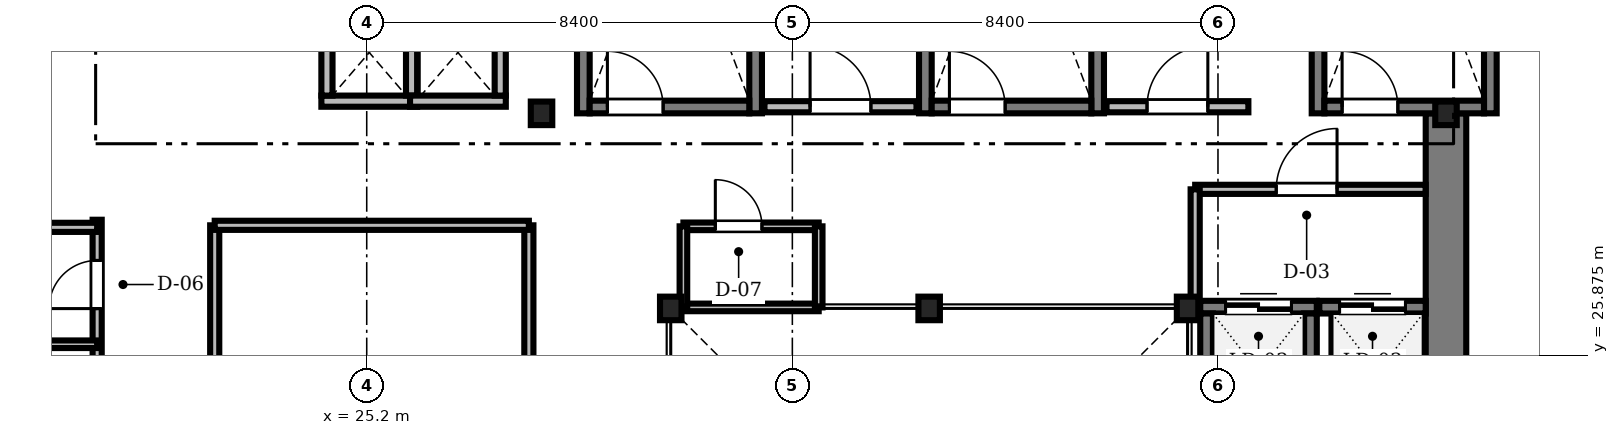
"""IFC4 building model, lengths in metres.
Left out: names, types, materials, properties, quantities, classifications, styles, units other than length and angle.
Written with IfcOpenShell. Run it as: python <this file> out.ifc"""

import sys

from ifc_helpers import new_model, si_unit, direction, frame, frame_2d, origin, origin_2d, place, context, subcontext, project, spatial, rectangle, i_section, extrude, source, transform, mapped, element, fill, save


model = new_model("IFC4")
c1 = context("Model", 3, precision=1e-05, world=origin(), true_north=direction((0.0, 1.0)))
c2 = subcontext(c1, "Body", "Model", "MODEL_VIEW")
j1 = project(units=[si_unit("LENGTHUNIT", "METRE"), si_unit("PLANEANGLEUNIT", "RADIAN")], contexts=[c1])
p1 = place(None, origin())
s1 = spatial("IfcSite", under=j1, at=p1, CompositionType="ELEMENT")
p2 = place(p1, origin())
s2 = spatial("IfcBuilding", under=s1, at=p2, CompositionType="ELEMENT")
p3 = place(p2, frame((0.0, 0.0, 144.6)))
s3 = spatial("IfcBuildingStorey", under=s2, at=p3, CompositionType="ELEMENT", Elevation=144.6)
m1 = source(origin(), c2, "Body", "SweptSolid", [
    extrude(rectangle(XDim=13.15, YDim=0.8, at=frame_2d((6.575, 0.0))), origin(), (0.0, 0.0, 1.0), 3.46),
])
p4 = place(p3, frame((46.5, 17.5, 0.0), z_axis=(0.0, 0.0, 1.0), x_axis=(0.0, 1.0, 0.0)))
e1 = element("IfcWall", 1, at=p4, inside=s3, PredefinedType="SHEAR", context=c2, shape_type="MappedRepresentation", body=[
    mapped(m1, transform((0.0, 0.0, 0.0), scale=1.0)),
])
m2 = source(origin(), c2, "Body", "SweptSolid", [
    extrude(i_section(OverallWidth=0.424, OverallDepth=0.465, WebThickness=0.035, FlangeThickness=0.056, FilletRadius=0.015, at=origin_2d()), origin(), (0.0, 0.0, 1.0), 3.46),
])
for number, where, z_axis, x_axis in (
    (2, (41.4, 26.8, 0.0), (0.0, 0.0, 1.0), (1.0, 0.0, 0.0)),
    (3, (36.3, 26.8, 0.0), (0.0, 0.0, 1.0), (1.0, 0.0, 0.0)),
    (4, (31.2, 26.8, 0.0), (0.0, 0.0, 1.0), (1.0, 0.0, 0.0)),
    (5, (28.65, 30.65, 0.0), (0.0, 0.0, 1.0), (1.0, 0.0, 0.0)),
    (6, (46.5, 30.65, 0.0), (0.0, 0.0, 1.0), (1.0, 0.0, 0.0)),
):
    element("IfcColumn", number, at=place(p3, frame(where, z_axis=z_axis, x_axis=x_axis)), inside=s3, PredefinedType="COLUMN", context=c2, shape_type="MappedRepresentation", body=[
        mapped(m2, transform((0.0, 0.0, 0.0), scale=1.0)),
    ])
m3 = source(origin(), c2, "Body", "SweptSolid", [
    extrude(rectangle(XDim=9.25, YDim=0.25, at=frame_2d((4.625, 0.0))), origin(), (0.0, 0.0, 1.0), 3.5),
])
for number, where, z_axis, x_axis in (
    (7, (29.475, 30.65, 0.0), (0.0, 0.0, 1.0), (0.0, 1.0, 0.0)),
    (8, (32.875, 30.65, 0.0), (0.0, 0.0, 1.0), (0.0, 1.0, 0.0)),
):
    element("IfcWall", number, at=place(p3, frame(where, z_axis=z_axis, x_axis=x_axis)), inside=s3, PredefinedType="SOLIDWALL", context=c2, shape_type="MappedRepresentation", body=[
        mapped(m3, transform((0.0, 0.0, 0.0), scale=1.0)),
    ])
m4 = source(origin(), c2, "Body", "SweptSolid", [
    extrude(rectangle(XDim=3.15, YDim=0.25, at=frame_2d((1.575, 0.0))), origin(), (0.0, 0.0, 1.0), 3.5),
])
p5 = place(p3, frame((29.6, 30.775, 0.0), z_axis=(0.0, 0.0, 1.0), x_axis=(1.0, 0.0, 0.0)))
e9 = element("IfcWall", 9, at=p5, inside=s3, PredefinedType="SOLIDWALL", context=c2, shape_type="MappedRepresentation", body=[
    mapped(m4, transform((0.0, 0.0, 0.0), scale=1.0)),
])
m5 = source(origin(), c2, "Body", "SweptSolid", [
    extrude(rectangle(XDim=1.1, YDim=2.2, at=frame_2d((0.55, 1.1))), frame((0.0, 0.135, 0.0), z_axis=(0.0, -1.0, 0.0), x_axis=(1.0, 0.0, 0.0)), (0.0, 0.0, 1.0), 0.27),
])
p6 = place(p5, frame((0.35, 0.0, 0.0)))
e10 = element("IfcOpeningElement", 10, at=p6, cuts=e9, PredefinedType="OPENING", context=c2, shape_type="MappedRepresentation", body=[
    mapped(m5, transform((0.0, 0.0, 0.0), scale=1.0)),
])
for number, where, z_axis, x_axis in (
    (11, (36.225, 30.65, 0.0), (0.0, 0.0, 1.0), (0.0, 1.0, 0.0)),
    (12, (39.625, 30.65, 0.0), (0.0, 0.0, 1.0), (0.0, 1.0, 0.0)),
):
    element("IfcWall", number, at=place(p3, frame(where, z_axis=z_axis, x_axis=x_axis)), inside=s3, PredefinedType="SOLIDWALL", context=c2, shape_type="MappedRepresentation", body=[
        mapped(m3, transform((0.0, 0.0, 0.0), scale=1.0)),
    ])
p7 = place(p3, frame((36.35, 30.775, 0.0), z_axis=(0.0, 0.0, 1.0), x_axis=(1.0, 0.0, 0.0)))
e13 = element("IfcWall", 13, at=p7, inside=s3, PredefinedType="SOLIDWALL", context=c2, shape_type="MappedRepresentation", body=[
    mapped(m4, transform((0.0, 0.0, 0.0), scale=1.0)),
])
p8 = place(p7, frame((0.35, 0.0, 0.0)))
e14 = element("IfcOpeningElement", 14, at=p8, cuts=e13, PredefinedType="OPENING", context=c2, shape_type="MappedRepresentation", body=[
    mapped(m5, transform((0.0, 0.0, 0.0), scale=1.0)),
])
for number, where, z_axis, x_axis in (
    (15, (43.975, 30.65, 0.0), (0.0, 0.0, 1.0), (0.0, 1.0, 0.0)),
    (16, (47.375, 30.65, 0.0), (0.0, 0.0, 1.0), (0.0, 1.0, 0.0)),
):
    element("IfcWall", number, at=place(p3, frame(where, z_axis=z_axis, x_axis=x_axis)), inside=s3, PredefinedType="SOLIDWALL", context=c2, shape_type="MappedRepresentation", body=[
        mapped(m3, transform((0.0, 0.0, 0.0), scale=1.0)),
    ])
p9 = place(p3, frame((44.1, 30.775, 0.0), z_axis=(0.0, 0.0, 1.0), x_axis=(1.0, 0.0, 0.0)))
e17 = element("IfcWall", 17, at=p9, inside=s3, PredefinedType="SOLIDWALL", context=c2, shape_type="MappedRepresentation", body=[
    mapped(m4, transform((0.0, 0.0, 0.0), scale=1.0)),
])
p10 = place(p9, frame((0.35, 0.0, 0.0)))
e18 = element("IfcOpeningElement", 18, at=p10, cuts=e17, PredefinedType="OPENING", context=c2, shape_type="MappedRepresentation", body=[
    mapped(m5, transform((0.0, 0.0, 0.0), scale=1.0)),
])
m6 = source(origin(), c2, "Body", "SweptSolid", [
    extrude(rectangle(XDim=3.0, YDim=0.22, at=frame_2d((1.5, 0.0))), origin(), (0.0, 0.0, 1.0), 3.46),
])
p11 = place(p3, frame((33.05, 30.78, 0.0), z_axis=(0.0, 0.0, 1.0), x_axis=(1.0, 0.0, 0.0)))
e19 = element("IfcWall", 19, at=p11, inside=s3, PredefinedType="SOLIDWALL", context=c2, shape_type="MappedRepresentation", body=[
    mapped(m6, transform((0.0, 0.0, 0.0), scale=1.0)),
])
m7 = source(origin(), c2, "Body", "SweptSolid", [
    extrude(rectangle(XDim=1.2, YDim=2.2, at=frame_2d((0.6, 1.1))), frame((0.0, 0.12, 0.0), z_axis=(0.0, -1.0, 0.0), x_axis=(1.0, 0.0, 0.0)), (0.0, 0.0, 1.0), 0.24),
])
p12 = place(p11, frame((0.9, 0.0, 0.0)))
e20 = element("IfcOpeningElement", 20, at=p12, cuts=e19, PredefinedType="OPENING", context=c2, shape_type="MappedRepresentation", body=[
    mapped(m7, transform((0.0, 0.0, 0.0), scale=1.0)),
])
m8 = source(origin(), c2, "Body", "SweptSolid", [
    extrude(rectangle(XDim=2.8, YDim=0.22, at=frame_2d((1.4, 0.0))), origin(), (0.0, 0.0, 1.0), 3.46),
])
p13 = place(p3, frame((39.8, 30.78, 0.0), z_axis=(0.0, 0.0, 1.0), x_axis=(1.0, 0.0, 0.0)))
e21 = element("IfcWall", 21, at=p13, inside=s3, PredefinedType="SOLIDWALL", context=c2, shape_type="MappedRepresentation", body=[
    mapped(m8, transform((0.0, 0.0, 0.0), scale=1.0)),
])
p14 = place(p13, frame((0.8, 0.0, 0.0)))
e22 = element("IfcOpeningElement", 22, at=p14, cuts=e21, PredefinedType="OPENING", context=c2, shape_type="MappedRepresentation", body=[
    mapped(m7, transform((0.0, 0.0, 0.0), scale=1.0)),
])
m9 = source(origin(), c2, "Body", "SweptSolid", [
    extrude(rectangle(XDim=1.89, YDim=0.22, at=frame_2d((0.945, 0.0))), origin(), (0.0, 0.0, 1.0), 3.46),
])
p15 = place(p3, frame((24.305, 30.89, 0.0), z_axis=(0.0, 0.0, 1.0), x_axis=(1.0, 0.0, 0.0)))
e23 = element("IfcWall", 23, at=p15, inside=s3, PredefinedType="SOLIDWALL", context=c2, shape_type="MappedRepresentation", body=[
    mapped(m9, transform((0.0, 0.0, 0.0), scale=1.0)),
])
m10 = source(origin(), c2, "Body", "SweptSolid", [
    extrude(rectangle(XDim=1.7, YDim=0.22, at=frame_2d((0.85, 0.0))), origin(), (0.0, 0.0, 1.0), 3.46),
])
for number, where, z_axis, x_axis in (
    (24, (24.415, 31.0, 0.0), (0.0, 0.0, 1.0), (0.0, 1.0, 0.0)),
    (25, (26.085, 31.0, 0.0), (0.0, 0.0, 1.0), (0.0, 1.0, 0.0)),
):
    element("IfcWall", number, at=place(p3, frame(where, z_axis=z_axis, x_axis=x_axis)), inside=s3, PredefinedType="SOLIDWALL", context=c2, shape_type="MappedRepresentation", body=[
        mapped(m10, transform((0.0, 0.0, 0.0), scale=1.0)),
    ])
p16 = place(p3, frame((26.055, 30.89, 0.0), z_axis=(0.0, 0.0, 1.0), x_axis=(1.0, 0.0, 0.0)))
e26 = element("IfcWall", 26, at=p16, inside=s3, PredefinedType="SOLIDWALL", context=c2, shape_type="MappedRepresentation", body=[
    mapped(m9, transform((0.0, 0.0, 0.0), scale=1.0)),
])
p17 = place(p3, frame((27.835, 31.0, 0.0), z_axis=(0.0, 0.0, 1.0), x_axis=(0.0, 1.0, 0.0)))
e27 = element("IfcWall", 27, at=p17, inside=s3, PredefinedType="SOLIDWALL", context=c2, shape_type="MappedRepresentation", body=[
    mapped(m10, transform((0.0, 0.0, 0.0), scale=1.0)),
])
m11 = source(origin(), c2, "Body", "SweptSolid", [
    extrude(rectangle(XDim=2.3, YDim=0.25, at=frame_2d((1.15, 0.0))), origin(), (0.0, 0.0, 1.0), 3.46),
])
p18 = place(p3, frame((41.65, 26.825, 0.0), z_axis=(0.0, 0.0, 1.0), x_axis=(1.0, 0.0, 0.0)))
e28 = element("IfcWall", 28, at=p18, inside=s3, PredefinedType="SOLIDWALL", context=c2, shape_type="MappedRepresentation", body=[
    mapped(m11, transform((0.0, 0.0, 0.0), scale=1.0)),
])
m12 = source(origin(), c2, "Body", "SweptSolid", [
    extrude(rectangle(XDim=1.3, YDim=2.3, at=frame_2d((0.65, 1.15))), frame((0.0, 0.135, 0.0), z_axis=(0.0, -1.0, 0.0), x_axis=(1.0, 0.0, 0.0)), (0.0, 0.0, 1.0), 0.27),
])
p19 = place(p18, frame((0.5, 0.0, 0.0)))
e29 = element("IfcOpeningElement", 29, at=p19, cuts=e28, PredefinedType="OPENING", context=c2, shape_type="MappedRepresentation", body=[
    mapped(m12, transform((0.0, 0.0, 0.0), scale=1.0)),
])
for number, where, z_axis, x_axis in (
    (30, (41.775, 24.4, 0.0), (0.0, 0.0, 1.0), (0.0, 1.0, 0.0)),
    (31, (43.825, 24.4, 0.0), (0.0, 0.0, 1.0), (0.0, 1.0, 0.0)),
):
    element("IfcWall", number, at=place(p3, frame(where, z_axis=z_axis, x_axis=x_axis)), inside=s3, PredefinedType="SOLIDWALL", context=c2, shape_type="MappedRepresentation", body=[
        mapped(m11, transform((0.0, 0.0, 0.0), scale=1.0)),
    ])
m13 = source(origin(), c2, "Body", "SweptSolid", [
    extrude(rectangle(XDim=2.1, YDim=0.25, at=frame_2d((1.05, 0.0))), origin(), (0.0, 0.0, 1.0), 3.46),
])
p20 = place(p3, frame((44.0, 26.825, 0.0), z_axis=(0.0, 0.0, 1.0), x_axis=(1.0, 0.0, 0.0)))
e32 = element("IfcWall", 32, at=p20, inside=s3, PredefinedType="SOLIDWALL", context=c2, shape_type="MappedRepresentation", body=[
    mapped(m13, transform((0.0, 0.0, 0.0), scale=1.0)),
])
p21 = place(p20, frame((0.4, 0.0, 0.0)))
e33 = element("IfcOpeningElement", 33, at=p21, cuts=e32, PredefinedType="OPENING", context=c2, shape_type="MappedRepresentation", body=[
    mapped(m12, transform((0.0, 0.0, 0.0), scale=1.0)),
])
m14 = source(origin(), c2, "Body", "SweptSolid", [
    extrude(rectangle(XDim=14.0, YDim=0.18, at=frame_2d((7.0, 0.0))), origin(), (0.0, 0.0, 1.0), 2.852),
])
p22 = place(p3, frame((19.88, 14.55, 0.0), z_axis=(0.0, 0.0, 1.0), x_axis=(0.0, 1.0, 0.0)))
e34 = element("IfcWall", 34, at=p22, inside=s3, PredefinedType="PARTITIONING", context=c2, shape_type="MappedRepresentation", body=[
    mapped(m14, transform((0.0, 0.0, 0.0), scale=1.0)),
])
m15 = source(origin(), c2, "Body", "SweptSolid", [
    extrude(rectangle(XDim=1.05, YDim=2.2, at=frame_2d((0.525, 1.1))), frame((0.0, 0.1, 0.0), z_axis=(0.0, -1.0, 0.0), x_axis=(1.0, 0.0, 0.0)), (0.0, 0.0, 1.0), 0.2),
])
p23 = place(p22, frame((1.788, 0.0, 0.0)))
e35 = element("IfcOpeningElement", 35, at=p23, cuts=e34, PredefinedType="OPENING", context=c2, shape_type="MappedRepresentation", body=[
    mapped(m15, transform((0.0, 0.0, 0.0), scale=1.0)),
])
m16 = source(origin(), c2, "Body", "SweptSolid", [
    extrude(rectangle(XDim=0.95, YDim=2.15, at=frame_2d((0.475, 1.075))), frame((0.0, 0.1, 0.0), z_axis=(0.0, -1.0, 0.0), x_axis=(1.0, 0.0, 0.0)), (0.0, 0.0, 1.0), 0.2),
])
p24 = place(p22, frame((7.63, 0.0, 0.0)))
e36 = element("IfcOpeningElement", 36, at=p24, cuts=e34, PredefinedType="OPENING", context=c2, shape_type="MappedRepresentation", body=[
    mapped(m16, transform((0.0, 0.0, 0.0), scale=1.0)),
])
p25 = place(p22, frame((12.247, 0.0, 0.0)))
e37 = element("IfcOpeningElement", 37, at=p25, cuts=e34, PredefinedType="OPENING", context=c2, shape_type="MappedRepresentation", body=[
    mapped(m16, transform((0.0, 0.0, 0.0), scale=1.0)),
])
m17 = source(origin(), c2, "Body", "SweptSolid", [
    extrude(rectangle(XDim=6.54, YDim=0.18, at=frame_2d((3.27, 0.0))), origin(), (0.0, 0.0, 1.0), 2.852),
])
p26 = place(p3, frame((22.2, 21.9, 0.0), z_axis=(0.0, 0.0, 1.0), x_axis=(0.0, 1.0, 0.0)))
e38 = element("IfcWall", 38, at=p26, inside=s3, PredefinedType="PARTITIONING", context=c2, shape_type="MappedRepresentation", body=[
    mapped(m17, transform((0.0, 0.0, 0.0), scale=1.0)),
])
p27 = place(p26, frame((2.2, 0.0, 0.0)))
e39 = element("IfcOpeningElement", 39, at=p27, cuts=e38, PredefinedType="OPENING", context=c2, shape_type="MappedRepresentation", body=[
    mapped(m15, transform((0.0, 0.0, 0.0), scale=1.0)),
])
m18 = source(origin(), c2, "Body", "SweptSolid", [
    extrude(rectangle(XDim=4.548, YDim=0.18, at=frame_2d((2.274, 0.0))), origin(), (0.0, 0.0, 1.0), 3.092),
])
p28 = place(p3, frame((41.55, 29.15, 0.0), z_axis=(0.0, 0.0, 1.0), x_axis=(1.0, 0.0, 0.0)))
e40 = element("IfcWall", 40, at=p28, inside=s3, PredefinedType="PARTITIONING", context=c2, shape_type="MappedRepresentation", body=[
    mapped(m18, transform((0.0, 0.0, 0.0), scale=1.0)),
])
m19 = source(origin(), c2, "Body", "SweptSolid", [
    extrude(rectangle(XDim=1.2, YDim=2.2, at=frame_2d((0.6, 1.1))), frame((0.0, 0.1, 0.0), z_axis=(0.0, -1.0, 0.0), x_axis=(1.0, 0.0, 0.0)), (0.0, 0.0, 1.0), 0.2),
])
p29 = place(p28, frame((1.6, 0.0, 0.0)))
e41 = element("IfcOpeningElement", 41, at=p29, cuts=e40, PredefinedType="OPENING", context=c2, shape_type="MappedRepresentation", body=[
    mapped(m19, transform((0.0, 0.0, 0.0), scale=1.0)),
])
m20 = source(origin(), c2, "Body", "SweptSolid", [
    extrude(rectangle(XDim=2.67, YDim=0.15, at=frame_2d((1.335, 0.0))), origin(), (0.0, 0.0, 1.0), 3.092),
])
p30 = place(p3, frame((31.45, 28.42, 0.0), z_axis=(0.0, 0.0, 1.0), x_axis=(1.0, 0.0, 0.0)))
e42 = element("IfcWall", 42, at=p30, inside=s3, PredefinedType="PARTITIONING", context=c2, shape_type="MappedRepresentation", body=[
    mapped(m20, transform((0.0, 0.0, 0.0), scale=1.0)),
])
m21 = source(origin(), c2, "Body", "SweptSolid", [
    extrude(rectangle(XDim=0.92, YDim=2.1, at=frame_2d((0.46, 1.05))), frame((0.0, 0.085, 0.0), z_axis=(0.0, -1.0, 0.0), x_axis=(1.0, 0.0, 0.0)), (0.0, 0.0, 1.0), 0.17),
])
p31 = place(p30, frame((0.63, 0.0, 0.0)))
e43 = element("IfcOpeningElement", 43, at=p31, cuts=e42, PredefinedType="OPENING", context=c2, shape_type="MappedRepresentation", body=[
    mapped(m21, transform((0.0, 0.0, 0.0), scale=1.0)),
])
m22 = source(origin(), c2, "Body", "SweptSolid", [
    extrude(rectangle(XDim=13.15, YDim=0.18, at=frame_2d((6.575, 0.0))), origin(), (0.0, 0.0, 1.0), 2.702),
])
p32 = place(p3, frame((6.73, 28.4, 0.0), z_axis=(0.0, 0.0, 1.0), x_axis=(1.0, 0.0, 0.0)))
e44 = element("IfcWall", 44, at=p32, inside=s3, PredefinedType="PARTITIONING", context=c2, shape_type="MappedRepresentation", body=[
    mapped(m22, transform((0.0, 0.0, 0.0), scale=1.0)),
])
p33 = place(p3, frame((28.4, 21.9, 0.0), z_axis=(0.0, 0.0, 1.0), x_axis=(0.0, 1.0, 0.0)))
e45 = element("IfcWall", 45, at=p33, inside=s3, PredefinedType="PARTITIONING", context=c2, shape_type="MappedRepresentation", body=[
    mapped(m17, transform((0.0, 0.0, 0.0), scale=1.0)),
])
m23 = source(origin(), c2, "Body", "SweptSolid", [
    extrude(rectangle(XDim=6.2, YDim=0.18, at=frame_2d((3.1, 0.0))), origin(), (0.0, 0.0, 1.0), 3.46),
])
p34 = place(p3, frame((22.2, 28.44, 0.0), z_axis=(0.0, 0.0, 1.0), x_axis=(1.0, 0.0, 0.0)))
e46 = element("IfcWall", 46, at=p34, inside=s3, PredefinedType="PARTITIONING", context=c2, shape_type="MappedRepresentation", body=[
    mapped(m23, transform((0.0, 0.0, 0.0), scale=1.0)),
])
m24 = source(origin(), c2, "Body", "SweptSolid", [
    extrude(rectangle(XDim=2.67, YDim=0.15, at=frame_2d((1.335, 0.0))), origin(), (0.0, 0.0, 1.0), 3.002),
])
p35 = place(p3, frame((31.45, 26.82, 0.0), z_axis=(0.0, 0.0, 1.0), x_axis=(1.0, 0.0, 0.0)))
e47 = element("IfcWall", 47, at=p35, inside=s3, PredefinedType="PARTITIONING", context=c2, shape_type="MappedRepresentation", body=[
    mapped(m24, transform((0.0, 0.0, 0.0), scale=1.0)),
])
m25 = source(origin(), c2, "Body", "SweptSolid", [
    extrude(rectangle(XDim=2.36, YDim=0.15, at=frame_2d((1.18, 0.0))), origin(), (0.0, 0.0, 1.0), 3.46),
])
p36 = place(p3, frame((17.52, 26.093, 0.0), z_axis=(0.0, 0.0, 1.0), x_axis=(1.0, 0.0, 0.0)))
e48 = element("IfcWall", 48, at=p36, inside=s3, PredefinedType="PARTITIONING", context=c2, shape_type="MappedRepresentation", body=[
    mapped(m25, transform((0.0, 0.0, 0.0), scale=1.0)),
])
m26 = source(origin(), c2, "Body", "SweptSolid", [
    extrude(rectangle(XDim=2.35, YDim=0.18, at=frame_2d((1.175, 0.0))), origin(), (0.0, 0.0, 1.0), 2.852),
])
p37 = place(p3, frame((41.55, 26.8, 0.0), z_axis=(0.0, 0.0, 1.0), x_axis=(0.0, 1.0, 0.0)))
e49 = element("IfcWall", 49, at=p37, inside=s3, PredefinedType="PARTITIONING", context=c2, shape_type="MappedRepresentation", body=[
    mapped(m26, transform((0.0, 0.0, 0.0), scale=1.0)),
])
m27 = source(origin(), c2, "Body", "SweptSolid", [
    extrude(rectangle(XDim=1.6, YDim=0.15, at=frame_2d((0.8, 0.0))), origin(), (0.0, 0.0, 1.0), 3.002),
])
for number, where, z_axis, x_axis in (
    (50, (31.45, 26.82, 0.0), (0.0, 0.0, 1.0), (0.0, 1.0, 0.0)),
    (51, (34.12, 26.82, 0.0), (0.0, 0.0, 1.0), (0.0, 1.0, 0.0)),
):
    element("IfcWall", number, at=place(p3, frame(where, z_axis=z_axis, x_axis=x_axis)), inside=s3, PredefinedType="PARTITIONING", context=c2, shape_type="MappedRepresentation", body=[
        mapped(m27, transform((0.0, 0.0, 0.0), scale=1.0)),
    ])
m28 = source(origin(), c2, "Body", "SweptSolid", [
    extrude(rectangle(XDim=1.1, YDim=2.2, at=frame_2d((0.55, 1.1))), frame((0.0, 0.025, 0.0), z_axis=(0.0, -1.0, 0.0), x_axis=(1.0, 0.0, 0.0)), (0.0, 0.0, 1.0), 0.05),
])
p38 = place(p6, origin())
e52 = element("IfcDoor", 52, at=p38, inside=s3, OperationType="SINGLE_SWING_LEFT", PredefinedType="DOOR", context=c2, shape_type="MappedRepresentation", body=[
    mapped(m28, transform((0.0, 0.0, 0.0), scale=1.0)),
])
fill(e10, e52)
p39 = place(p8, origin())
e53 = element("IfcDoor", 53, at=p39, inside=s3, OperationType="SINGLE_SWING_LEFT", PredefinedType="DOOR", context=c2, shape_type="MappedRepresentation", body=[
    mapped(m28, transform((0.0, 0.0, 0.0), scale=1.0)),
])
fill(e14, e53)
p40 = place(p10, origin())
e54 = element("IfcDoor", 54, at=p40, inside=s3, OperationType="SINGLE_SWING_LEFT", PredefinedType="DOOR", context=c2, shape_type="MappedRepresentation", body=[
    mapped(m28, transform((0.0, 0.0, 0.0), scale=1.0)),
])
fill(e18, e54)
m29 = source(origin(), c2, "Body", "SweptSolid", [
    extrude(rectangle(XDim=1.2, YDim=2.2, at=frame_2d((0.6, 1.1))), frame((0.0, 0.025, 0.0), z_axis=(0.0, -1.0, 0.0), x_axis=(1.0, 0.0, 0.0)), (0.0, 0.0, 1.0), 0.05),
])
p41 = place(p12, origin())
e55 = element("IfcDoor", 55, at=p41, inside=s3, OperationType="SINGLE_SWING_LEFT", PredefinedType="DOOR", context=c2, shape_type="MappedRepresentation", body=[
    mapped(m29, transform((0.0, 0.0, 0.0), scale=1.0)),
])
fill(e20, e55)
p42 = place(p14, origin())
e56 = element("IfcDoor", 56, at=p42, inside=s3, OperationType="SINGLE_SWING_RIGHT", PredefinedType="DOOR", context=c2, shape_type="MappedRepresentation", body=[
    mapped(m29, transform((0.0, 0.0, 0.0), scale=1.0)),
])
fill(e22, e56)
m30 = source(origin(), c2, "Body", "SweptSolid", [
    extrude(rectangle(XDim=1.3, YDim=2.3, at=frame_2d((0.65, 1.15))), frame((0.0, 0.025, 0.0), z_axis=(0.0, -1.0, 0.0), x_axis=(1.0, 0.0, 0.0)), (0.0, 0.0, 1.0), 0.05),
])
p43 = place(p19, origin())
e57 = element("IfcDoor", 57, at=p43, inside=s3, OperationType="DOUBLE_DOOR_SLIDING", PredefinedType="DOOR", context=c2, shape_type="MappedRepresentation", body=[
    mapped(m30, transform((0.0, 0.0, 0.0), scale=1.0)),
])
fill(e29, e57)
p44 = place(p21, origin())
e58 = element("IfcDoor", 58, at=p44, inside=s3, OperationType="DOUBLE_DOOR_SLIDING", PredefinedType="DOOR", context=c2, shape_type="MappedRepresentation", body=[
    mapped(m30, transform((0.0, 0.0, 0.0), scale=1.0)),
])
fill(e33, e58)
m31 = source(origin(), c2, "Body", "SweptSolid", [
    extrude(rectangle(XDim=0.95, YDim=2.15, at=frame_2d((0.475, 1.075))), frame((0.0, 0.025, 0.0), z_axis=(0.0, -1.0, 0.0), x_axis=(1.0, 0.0, 0.0)), (0.0, 0.0, 1.0), 0.05),
])
p45 = place(p25, origin())
e59 = element("IfcDoor", 59, at=p45, inside=s3, OperationType="SINGLE_SWING_LEFT", PredefinedType="DOOR", context=c2, shape_type="MappedRepresentation", body=[
    mapped(m31, transform((0.0, 0.0, 0.0), scale=1.0)),
])
fill(e37, e59)
p46 = place(p29, origin())
e60 = element("IfcDoor", 60, at=p46, inside=s3, OperationType="SINGLE_SWING_RIGHT", PredefinedType="DOOR", context=c2, shape_type="MappedRepresentation", body=[
    mapped(m29, transform((0.0, 0.0, 0.0), scale=1.0)),
])
fill(e41, e60)
m32 = source(origin(), c2, "Body", "SweptSolid", [
    extrude(rectangle(XDim=0.92, YDim=2.1, at=frame_2d((0.46, 1.05))), frame((0.0, 0.025, 0.0), z_axis=(0.0, -1.0, 0.0), x_axis=(1.0, 0.0, 0.0)), (0.0, 0.0, 1.0), 0.05),
])
p47 = place(p31, origin())
e61 = element("IfcDoor", 61, at=p47, inside=s3, OperationType="SINGLE_SWING_LEFT", PredefinedType="DOOR", context=c2, shape_type="MappedRepresentation", body=[
    mapped(m32, transform((0.0, 0.0, 0.0), scale=1.0)),
])
fill(e43, e61)
save(model, sys.argv[1])
